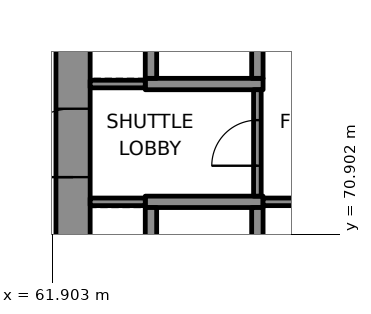
"""IFC4 building model, lengths in metres.
Left out: names, types, materials, properties, quantities, classifications, styles, units other than length and angle.
Written with IfcOpenShell. Run it as: python <this file> out.ifc"""

import sys

from ifc_helpers import new_model, si_unit, direction, frame, frame_2d, origin, place, context, subcontext, project, spatial, rectangle, extrude, element, fill, save


model = new_model("IFC4")
c1 = context("Model", 3, precision=1e-05, world=origin(), true_north=direction((0.0, 1.0)))
c2 = subcontext(c1, "Body", "Model", "MODEL_VIEW")
j1 = project(units=[si_unit("LENGTHUNIT", "METRE"), si_unit("PLANEANGLEUNIT", "RADIAN")], contexts=[c1])
p1 = place(None, origin())
s1 = spatial("IfcSite", under=j1, at=p1, CompositionType="ELEMENT")
p2 = place(p1, origin())
s2 = spatial("IfcBuilding", under=s1, at=p2, CompositionType="ELEMENT")
p3 = place(p2, frame((0.0, 0.0, 35.5)))
s3 = spatial("IfcBuildingStorey", under=s2, at=p3, CompositionType="ELEMENT", Elevation=35.5)
p4 = place(p3, frame((62.45, 66.9, 0.0), z_axis=(0.0, 0.0, 1.0), x_axis=(0.0, 1.0, 0.0)))
e1 = element("IfcWall", 1, at=p4, inside=s3, PredefinedType="SHEAR", context=c2, shape_type="SweptSolid", body=[
    extrude(rectangle(XDim=16.2, YDim=0.9, at=frame_2d((8.1, 0.0))), origin(), (0.0, 0.0, 1.0), 4.3),
])
p5 = place(p4, frame((5.5, 0.0, 0.0)))
e2 = element("IfcOpeningElement", 2, at=p5, cuts=e1, PredefinedType="OPENING", context=c2, shape_type="SweptSolid", body=[
    extrude(rectangle(XDim=1.8, YDim=2.1, at=frame_2d((0.9, 1.05))), frame((0.0, 0.46, 0.0), z_axis=(0.0, -1.0, 0.0), x_axis=(1.0, 0.0, 0.0)), (0.0, 0.0, 1.0), 0.92),
])
for number, where, z_axis, x_axis in (
    (3, (64.35, 71.75, 0.0), (0.0, 0.0, 1.0), (1.0, 0.0, 0.0)),
    (4, (64.35, 74.85, 0.0), (0.0, 0.0, 1.0), (1.0, 0.0, 0.0)),
):
    element("IfcWall", number, at=place(p3, frame(where, z_axis=z_axis, x_axis=x_axis)), inside=s3, PredefinedType="SHEAR", context=c2, shape_type="SweptSolid", body=[
        extrude(rectangle(XDim=3.1, YDim=0.3, at=frame_2d((1.55, 0.0))), origin(), (0.0, 0.0, 1.0), 4.3),
    ])
for number, where, z_axis, x_axis in (
    (5, (64.5, 69.0, 0.0), (0.0, 0.0, 1.0), (0.0, 1.0, 0.0)),
    (6, (64.5, 75.0, 0.0), (0.0, 0.0, 1.0), (0.0, 1.0, 0.0)),
    (7, (67.3, 69.0, 0.0), (0.0, 0.0, 1.0), (0.0, 1.0, 0.0)),
    (8, (67.3, 75.0, 0.0), (0.0, 0.0, 1.0), (0.0, 1.0, 0.0)),
):
    element("IfcWall", number, at=place(p3, frame(where, z_axis=z_axis, x_axis=x_axis)), inside=s3, PredefinedType="SHEAR", context=c2, shape_type="SweptSolid", body=[
        extrude(rectangle(XDim=2.6, YDim=0.3, at=frame_2d((1.3, 0.0))), origin(), (0.0, 0.0, 1.0), 4.3),
    ])
p6 = place(p3, frame((71.348, 110.424, 0.0), z_axis=(0.0, 0.0, 1.0), x_axis=(-0.500000550228, -0.86602508611, 0.0)))
e9 = element("IfcWall", 9, at=p6, inside=s3, PredefinedType="SOLIDWALL", context=c2, shape_type="SweptSolid", body=[
    extrude(rectangle(XDim=57.704, YDim=0.3, at=frame_2d((28.852, 0.0))), origin(), (0.0, 0.0, 1.0), 4.3),
])
p7 = place(p6, frame((0.89, 0.0, 0.8)))
e10 = element("IfcOpeningElement", 10, at=p7, cuts=e9, PredefinedType="OPENING", context=c2, shape_type="SweptSolid", body=[
    extrude(rectangle(XDim=3.0, YDim=2.4, at=frame_2d((1.5, 1.2))), frame((0.0, 0.16, 0.0), z_axis=(0.0, -1.0, 0.0), x_axis=(1.0, 0.0, 0.0)), (0.0, 0.0, 1.0), 0.32),
])
p8 = place(p6, frame((4.67, 0.0, 0.8)))
e11 = element("IfcOpeningElement", 11, at=p8, cuts=e9, PredefinedType="OPENING", context=c2, shape_type="SweptSolid", body=[
    extrude(rectangle(XDim=3.0, YDim=2.4, at=frame_2d((1.5, 1.2))), frame((0.0, 0.16, 0.0), z_axis=(0.0, -1.0, 0.0), x_axis=(1.0, 0.0, 0.0)), (0.0, 0.0, 1.0), 0.32),
])
p9 = place(p6, frame((8.451, 0.0, 0.8)))
e12 = element("IfcOpeningElement", 12, at=p9, cuts=e9, PredefinedType="OPENING", context=c2, shape_type="SweptSolid", body=[
    extrude(rectangle(XDim=3.0, YDim=2.4, at=frame_2d((1.5, 1.2))), frame((0.0, 0.16, 0.0), z_axis=(0.0, -1.0, 0.0), x_axis=(1.0, 0.0, 0.0)), (0.0, 0.0, 1.0), 0.32),
])
p10 = place(p6, frame((12.231, 0.0, 0.8)))
e13 = element("IfcOpeningElement", 13, at=p10, cuts=e9, PredefinedType="OPENING", context=c2, shape_type="SweptSolid", body=[
    extrude(rectangle(XDim=3.0, YDim=2.4, at=frame_2d((1.5, 1.2))), frame((0.0, 0.16, 0.0), z_axis=(0.0, -1.0, 0.0), x_axis=(1.0, 0.0, 0.0)), (0.0, 0.0, 1.0), 0.32),
])
p11 = place(p6, frame((16.011, 0.0, 0.8)))
e14 = element("IfcOpeningElement", 14, at=p11, cuts=e9, PredefinedType="OPENING", context=c2, shape_type="SweptSolid", body=[
    extrude(rectangle(XDim=3.0, YDim=2.4, at=frame_2d((1.5, 1.2))), frame((0.0, 0.16, 0.0), z_axis=(0.0, -1.0, 0.0), x_axis=(1.0, 0.0, 0.0)), (0.0, 0.0, 1.0), 0.32),
])
p12 = place(p6, frame((19.792, 0.0, 0.8)))
e15 = element("IfcOpeningElement", 15, at=p12, cuts=e9, PredefinedType="OPENING", context=c2, shape_type="SweptSolid", body=[
    extrude(rectangle(XDim=3.0, YDim=2.4, at=frame_2d((1.5, 1.2))), frame((0.0, 0.16, 0.0), z_axis=(0.0, -1.0, 0.0), x_axis=(1.0, 0.0, 0.0)), (0.0, 0.0, 1.0), 0.32),
])
p13 = place(p6, frame((23.572, 0.0, 0.8)))
e16 = element("IfcOpeningElement", 16, at=p13, cuts=e9, PredefinedType="OPENING", context=c2, shape_type="SweptSolid", body=[
    extrude(rectangle(XDim=3.0, YDim=2.4, at=frame_2d((1.5, 1.2))), frame((0.0, 0.16, 0.0), z_axis=(0.0, -1.0, 0.0), x_axis=(1.0, 0.0, 0.0)), (0.0, 0.0, 1.0), 0.32),
])
p14 = place(p6, frame((27.352, 0.0, 0.8)))
e17 = element("IfcOpeningElement", 17, at=p14, cuts=e9, PredefinedType="OPENING", context=c2, shape_type="SweptSolid", body=[
    extrude(rectangle(XDim=3.0, YDim=2.4, at=frame_2d((1.5, 1.2))), frame((0.0, 0.16, 0.0), z_axis=(0.0, -1.0, 0.0), x_axis=(1.0, 0.0, 0.0)), (0.0, 0.0, 1.0), 0.32),
])
p15 = place(p6, frame((31.132, 0.0, 0.8)))
e18 = element("IfcOpeningElement", 18, at=p15, cuts=e9, PredefinedType="OPENING", context=c2, shape_type="SweptSolid", body=[
    extrude(rectangle(XDim=3.0, YDim=2.4, at=frame_2d((1.5, 1.2))), frame((0.0, 0.16, 0.0), z_axis=(0.0, -1.0, 0.0), x_axis=(1.0, 0.0, 0.0)), (0.0, 0.0, 1.0), 0.32),
])
p16 = place(p6, frame((34.913, 0.0, 0.8)))
e19 = element("IfcOpeningElement", 19, at=p16, cuts=e9, PredefinedType="OPENING", context=c2, shape_type="SweptSolid", body=[
    extrude(rectangle(XDim=3.0, YDim=2.4, at=frame_2d((1.5, 1.2))), frame((0.0, 0.16, 0.0), z_axis=(0.0, -1.0, 0.0), x_axis=(1.0, 0.0, 0.0)), (0.0, 0.0, 1.0), 0.32),
])
p17 = place(p6, frame((38.693, 0.0, 0.8)))
e20 = element("IfcOpeningElement", 20, at=p17, cuts=e9, PredefinedType="OPENING", context=c2, shape_type="SweptSolid", body=[
    extrude(rectangle(XDim=3.0, YDim=2.4, at=frame_2d((1.5, 1.2))), frame((0.0, 0.16, 0.0), z_axis=(0.0, -1.0, 0.0), x_axis=(1.0, 0.0, 0.0)), (0.0, 0.0, 1.0), 0.32),
])
p18 = place(p6, frame((42.473, 0.0, 0.8)))
e21 = element("IfcOpeningElement", 21, at=p18, cuts=e9, PredefinedType="OPENING", context=c2, shape_type="SweptSolid", body=[
    extrude(rectangle(XDim=3.0, YDim=2.4, at=frame_2d((1.5, 1.2))), frame((0.0, 0.16, 0.0), z_axis=(0.0, -1.0, 0.0), x_axis=(1.0, 0.0, 0.0)), (0.0, 0.0, 1.0), 0.32),
])
p19 = place(p6, frame((46.253, 0.0, 0.8)))
e22 = element("IfcOpeningElement", 22, at=p19, cuts=e9, PredefinedType="OPENING", context=c2, shape_type="SweptSolid", body=[
    extrude(rectangle(XDim=3.0, YDim=2.4, at=frame_2d((1.5, 1.2))), frame((0.0, 0.16, 0.0), z_axis=(0.0, -1.0, 0.0), x_axis=(1.0, 0.0, 0.0)), (0.0, 0.0, 1.0), 0.32),
])
p20 = place(p6, frame((50.033, 0.0, 0.8)))
e23 = element("IfcOpeningElement", 23, at=p20, cuts=e9, PredefinedType="OPENING", context=c2, shape_type="SweptSolid", body=[
    extrude(rectangle(XDim=3.0, YDim=2.4, at=frame_2d((1.5, 1.2))), frame((0.0, 0.16, 0.0), z_axis=(0.0, -1.0, 0.0), x_axis=(1.0, 0.0, 0.0)), (0.0, 0.0, 1.0), 0.32),
])
p21 = place(p6, frame((53.814, 0.0, 0.8)))
e24 = element("IfcOpeningElement", 24, at=p21, cuts=e9, PredefinedType="OPENING", context=c2, shape_type="SweptSolid", body=[
    extrude(rectangle(XDim=3.0, YDim=2.4, at=frame_2d((1.5, 1.2))), frame((0.0, 0.16, 0.0), z_axis=(0.0, -1.0, 0.0), x_axis=(1.0, 0.0, 0.0)), (0.0, 0.0, 1.0), 0.32),
])
p22 = place(p3, frame((62.9, 71.75, 0.0), z_axis=(0.0, 0.0, 1.0), x_axis=(1.0, 0.0, 0.0)))
e25 = element("IfcWall", 25, at=p22, inside=s3, PredefinedType="PARTITIONING", context=c2, shape_type="SweptSolid", body=[
    extrude(rectangle(XDim=1.45, YDim=0.2, at=frame_2d((0.725, 0.0))), origin(), (0.0, 0.0, 1.0), 4.3),
])
p23 = place(p3, frame((67.45, 71.75, 0.0), z_axis=(0.0, 0.0, 1.0), x_axis=(1.0, 0.0, 0.0)))
e26 = element("IfcWall", 26, at=p23, inside=s3, PredefinedType="PARTITIONING", context=c2, shape_type="SweptSolid", body=[
    extrude(rectangle(XDim=2.85, YDim=0.2, at=frame_2d((1.425, 0.0))), origin(), (0.0, 0.0, 1.0), 4.3),
])
p24 = place(p3, frame((62.9, 74.85, 0.0), z_axis=(0.0, 0.0, 1.0), x_axis=(1.0, 0.0, 0.0)))
e27 = element("IfcWall", 27, at=p24, inside=s3, PredefinedType="PARTITIONING", context=c2, shape_type="SweptSolid", body=[
    extrude(rectangle(XDim=1.45, YDim=0.2, at=frame_2d((0.725, 0.0))), origin(), (0.0, 0.0, 1.0), 4.3),
])
p25 = place(p3, frame((67.3, 71.9, 0.0), z_axis=(0.0, 0.0, 1.0), x_axis=(0.0, 1.0, 0.0)))
e28 = element("IfcWall", 28, at=p25, inside=s3, PredefinedType="PARTITIONING", context=c2, shape_type="SweptSolid", body=[
    extrude(rectangle(XDim=2.8, YDim=0.2, at=frame_2d((1.4, 0.0))), origin(), (0.0, 0.0, 1.0), 4.3),
])
p26 = place(p25, frame((0.8, 0.0, 0.0)))
e29 = element("IfcOpeningElement", 29, at=p26, cuts=e28, PredefinedType="OPENING", context=c2, shape_type="SweptSolid", body=[
    extrude(rectangle(XDim=1.2, YDim=2.1, at=frame_2d((0.6, 1.05))), frame((0.0, 0.11, 0.0), z_axis=(0.0, -1.0, 0.0), x_axis=(1.0, 0.0, 0.0)), (0.0, 0.0, 1.0), 0.22),
])
p27 = place(p26, origin())
e30 = element("IfcDoor", 30, at=p27, inside=s3, OperationType="SINGLE_SWING_RIGHT", PredefinedType="DOOR", context=c2, shape_type="SweptSolid", body=[
    extrude(rectangle(XDim=1.2, YDim=2.1, at=frame_2d((0.6, 1.05))), frame((0.0, 0.025, 0.0), z_axis=(0.0, -1.0, 0.0), x_axis=(1.0, 0.0, 0.0)), (0.0, 0.0, 1.0), 0.05),
])
fill(e29, e30)
p28 = place(p5, origin())
e31 = element("IfcDoor", 31, at=p28, inside=s3, OperationType="SINGLE_SWING_LEFT", PredefinedType="DOOR", context=c2, shape_type="SweptSolid", body=[
    extrude(rectangle(XDim=1.8, YDim=2.1, at=frame_2d((0.9, 1.05))), frame((0.0, 0.17, 0.0), z_axis=(0.0, -1.0, 0.0), x_axis=(1.0, 0.0, 0.0)), (0.0, 0.0, 1.0), 0.34),
])
fill(e2, e31)
save(model, sys.argv[1])
